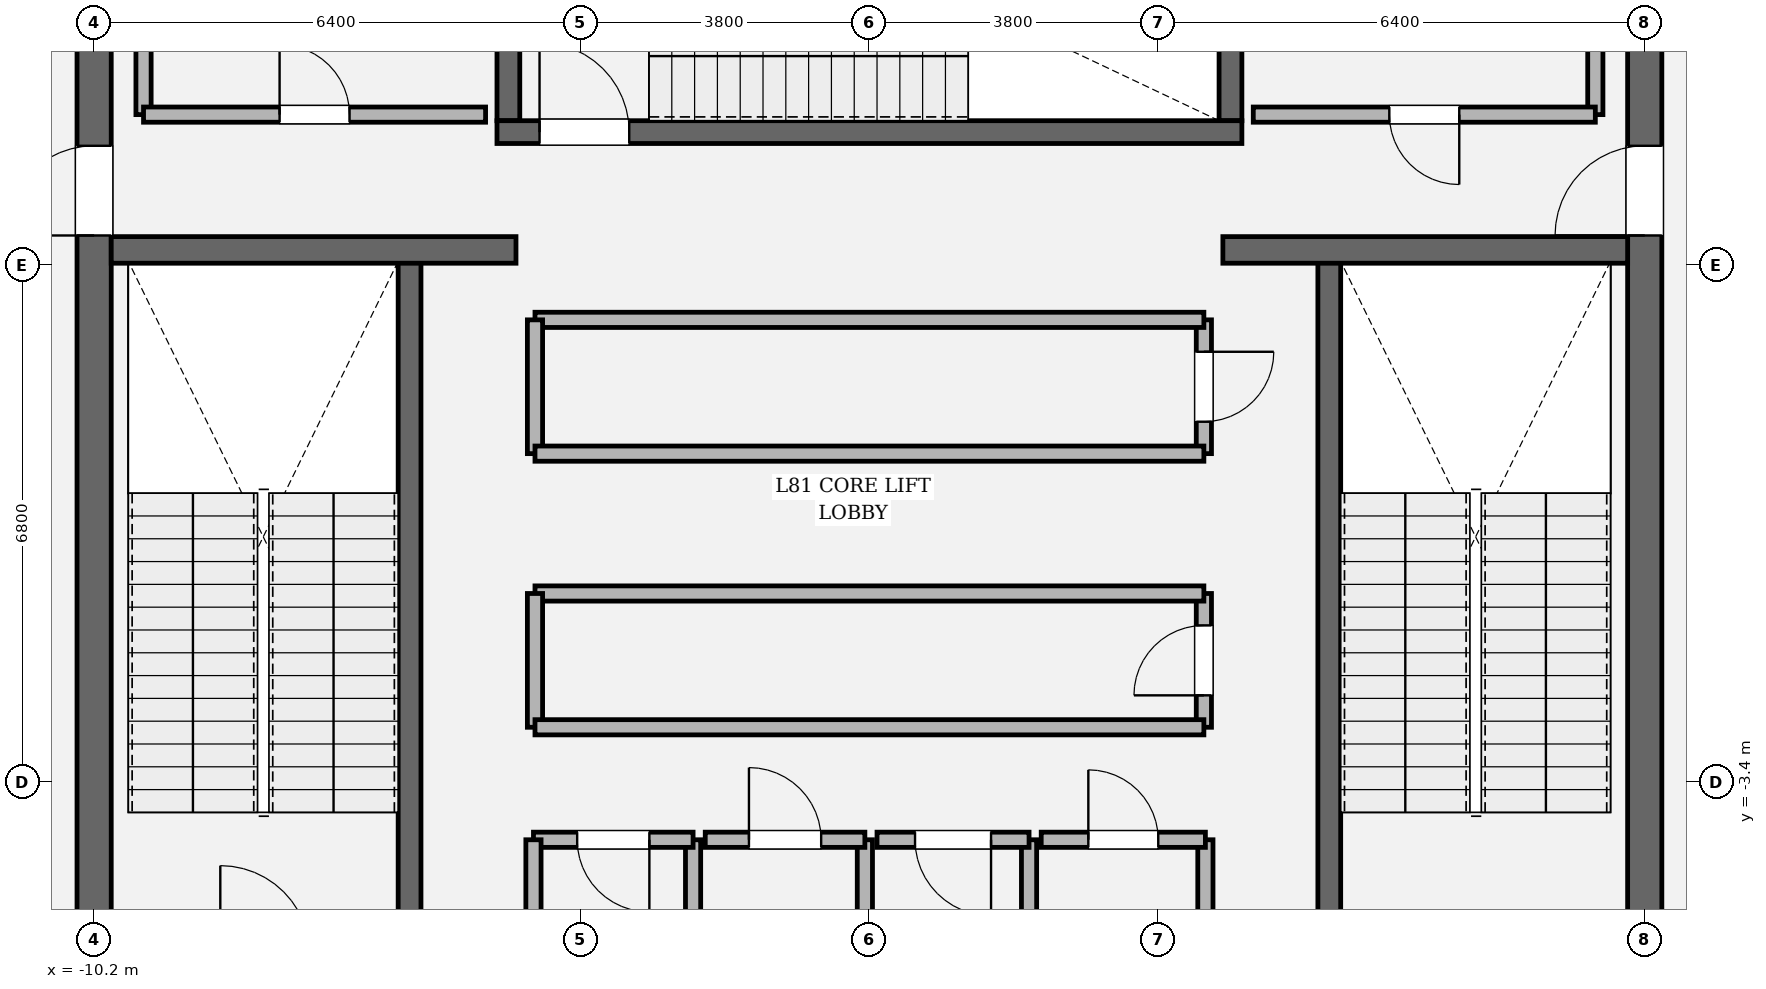
"""IFC4 building model, lengths in metres.
Left out: names, types, materials, properties, quantities, classifications, styles, units other than length and angle.
Written with IfcOpenShell. Run it as: python <this file> out.ifc"""

import sys

from ifc_helpers import new_model, si_unit, direction, frame, frame_2d, origin, place, context, subcontext, project, spatial, rectangle, extrude, element, fill, save


model = new_model("IFC4")
c1 = context("Model", 3, precision=1e-05, world=origin(), true_north=direction((0.0, 1.0)))
c2 = subcontext(c1, "Body", "Model", "MODEL_VIEW")
j1 = project(units=[si_unit("LENGTHUNIT", "METRE"), si_unit("PLANEANGLEUNIT", "RADIAN")], contexts=[c1])
p1 = place(None, origin())
s1 = spatial("IfcSite", under=j1, at=p1, CompositionType="ELEMENT")
p2 = place(p1, origin())
s2 = spatial("IfcBuilding", under=s1, at=p2, CompositionType="ELEMENT")
p3 = place(p2, frame((0.0, 0.0, 343.8)))
s3 = spatial("IfcBuildingStorey", under=s2, at=p3, CompositionType="ELEMENT", Elevation=343.8)
p4 = place(p3, frame((-10.2, -8.975, 0.0), z_axis=(0.0, 0.0, 1.0), x_axis=(0.0, 1.0, 0.0)))
e1 = element("IfcWall", 1, at=p4, inside=s3, PredefinedType="SHEAR", context=c2, shape_type="SweptSolid", body=[
    extrude(rectangle(XDim=17.95, YDim=0.45, at=frame_2d((8.975, 0.0))), origin(), (0.0, 0.0, 1.0), 4.5),
])
p5 = place(p4, frame((12.765, 0.0, 0.0)))
e2 = element("IfcOpeningElement", 2, at=p5, cuts=e1, PredefinedType="OPENING", context=c2, shape_type="SweptSolid", body=[
    extrude(rectangle(XDim=1.18, YDim=2.2, at=frame_2d((0.59, 1.1))), frame((0.0, 0.235, 0.0), z_axis=(0.0, -1.0, 0.0), x_axis=(1.0, 0.0, 0.0)), (0.0, 0.0, 1.0), 0.47),
])
p6 = place(p3, frame((10.2, 8.975, 0.0), z_axis=(0.0, 0.0, 1.0), x_axis=(0.0, -1.0, 0.0)))
e3 = element("IfcWall", 3, at=p6, inside=s3, PredefinedType="SHEAR", context=c2, shape_type="SweptSolid", body=[
    extrude(rectangle(XDim=17.95, YDim=0.45, at=frame_2d((8.975, 0.0))), origin(), (0.0, 0.0, 1.0), 4.5),
])
p7 = place(p6, frame((4.005, 0.0, 0.0)))
e4 = element("IfcOpeningElement", 4, at=p7, cuts=e3, PredefinedType="OPENING", context=c2, shape_type="SweptSolid", body=[
    extrude(rectangle(XDim=1.18, YDim=2.2, at=frame_2d((0.59, 1.1))), frame((0.0, 0.235, 0.0), z_axis=(0.0, -1.0, 0.0), x_axis=(1.0, 0.0, 0.0)), (0.0, 0.0, 1.0), 0.47),
])
for number, where, z_axis, x_axis in (
    (5, (-6.05, -5.5, 0.0), (0.0, 0.0, 1.0), (0.0, 1.0, 0.0)),
    (6, (6.05, 3.45, 0.0), (0.0, 0.0, 1.0), (0.0, -1.0, 0.0)),
):
    element("IfcWall", number, at=place(p3, frame(where, z_axis=z_axis, x_axis=x_axis)), inside=s3, PredefinedType="SOLIDWALL", context=c2, shape_type="SweptSolid", body=[
        extrude(rectangle(XDim=8.95, YDim=0.3, at=frame_2d((4.475, 0.0))), origin(), (0.0, 0.0, 1.0), 4.5),
    ])
for number, where, z_axis, x_axis in (
    (7, (-4.75, 5.3, 0.0), (0.0, 0.0, 1.0), (0.0, 1.0, 0.0)),
    (8, (4.75, 8.975, 0.0), (0.0, 0.0, 1.0), (0.0, -1.0, 0.0)),
):
    element("IfcWall", number, at=place(p3, frame(where, z_axis=z_axis, x_axis=x_axis)), inside=s3, PredefinedType="SOLIDWALL", context=c2, shape_type="SweptSolid", body=[
        extrude(rectangle(XDim=3.675, YDim=0.3, at=frame_2d((1.837, 0.0))), origin(), (0.0, 0.0, 1.0), 4.5),
    ])
p8 = place(p3, frame((-4.9, 5.15, 0.0), z_axis=(0.0, 0.0, 1.0), x_axis=(1.0, 0.0, 0.0)))
e9 = element("IfcWall", 9, at=p8, inside=s3, PredefinedType="SOLIDWALL", context=c2, shape_type="SweptSolid", body=[
    extrude(rectangle(XDim=9.8, YDim=0.3, at=frame_2d((4.9, 0.0))), origin(), (0.0, 0.0, 1.0), 4.5),
])
p9 = place(p8, frame((0.56, 0.0, 0.0)))
e10 = element("IfcOpeningElement", 10, at=p9, cuts=e9, PredefinedType="OPENING", context=c2, shape_type="SweptSolid", body=[
    extrude(rectangle(XDim=1.18, YDim=2.2, at=frame_2d((0.59, 1.1))), frame((0.0, 0.16, 0.0), z_axis=(0.0, -1.0, 0.0), x_axis=(1.0, 0.0, 0.0)), (0.0, 0.0, 1.0), 0.32),
])
for number, where, z_axis, x_axis in (
    (11, (-9.975, 3.6, 0.0), (0.0, 0.0, 1.0), (1.0, 0.0, 0.0)),
    (12, (4.65, 3.6, 0.0), (0.0, 0.0, 1.0), (1.0, 0.0, 0.0)),
):
    element("IfcWall", number, at=place(p3, frame(where, z_axis=z_axis, x_axis=x_axis)), inside=s3, PredefinedType="SOLIDWALL", context=c2, shape_type="SweptSolid", body=[
        extrude(rectangle(XDim=5.325, YDim=0.35, at=frame_2d((2.663, 0.0))), origin(), (0.0, 0.0, 1.0), 4.5),
    ])
p10 = place(p3, frame((-2.32, -5.9, 0.0), z_axis=(0.0, 0.0, 1.0), x_axis=(0.0, 1.0, 0.0)))
e13 = element("IfcWall", 13, at=p10, inside=s3, PredefinedType="SOLIDWALL", context=c2, shape_type="SweptSolid", body=[
    extrude(rectangle(XDim=1.74, YDim=0.2, at=frame_2d((0.87, 0.0))), origin(), (0.0, 0.0, 1.0), 4.28),
])
p11 = place(p3, frame((-2.32, -4.16, 0.0), z_axis=(0.0, 0.0, 1.0), x_axis=(-1.0, 0.0, 0.0)))
e14 = element("IfcWall", 14, at=p11, inside=s3, PredefinedType="SOLIDWALL", context=c2, shape_type="SweptSolid", body=[
    extrude(rectangle(XDim=2.1, YDim=0.2, at=frame_2d((1.05, 0.0))), origin(), (0.0, 0.0, 1.0), 4.28),
])
p12 = place(p11, frame((0.575, 0.0, 0.0)))
e15 = element("IfcOpeningElement", 15, at=p12, cuts=e14, PredefinedType="OPENING", context=c2, shape_type="SweptSolid", body=[
    extrude(rectangle(XDim=0.95, YDim=2.15, at=frame_2d((0.475, 1.075))), frame((0.0, 0.11, 0.0), z_axis=(0.0, -1.0, 0.0), x_axis=(1.0, 0.0, 0.0)), (0.0, 0.0, 1.0), 0.22),
])
for number, where, z_axis, x_axis in (
    (16, (-4.42, -4.16, 0.0), (0.0, 0.0, 1.0), (0.0, -1.0, 0.0)),
    (17, (-0.06, -5.9, 0.0), (0.0, 0.0, 1.0), (0.0, 1.0, 0.0)),
):
    element("IfcWall", number, at=place(p3, frame(where, z_axis=z_axis, x_axis=x_axis)), inside=s3, PredefinedType="SOLIDWALL", context=c2, shape_type="SweptSolid", body=[
        extrude(rectangle(XDim=1.74, YDim=0.2, at=frame_2d((0.87, 0.0))), origin(), (0.0, 0.0, 1.0), 4.28),
    ])
p13 = place(p3, frame((-0.06, -4.16, 0.0), z_axis=(0.0, 0.0, 1.0), x_axis=(-1.0, 0.0, 0.0)))
e18 = element("IfcWall", 18, at=p13, inside=s3, PredefinedType="SOLIDWALL", context=c2, shape_type="SweptSolid", body=[
    extrude(rectangle(XDim=2.1, YDim=0.2, at=frame_2d((1.05, 0.0))), origin(), (0.0, 0.0, 1.0), 4.28),
])
p14 = place(p13, frame((0.575, 0.0, 0.0)))
e19 = element("IfcOpeningElement", 19, at=p14, cuts=e18, PredefinedType="OPENING", context=c2, shape_type="SweptSolid", body=[
    extrude(rectangle(XDim=0.95, YDim=2.15, at=frame_2d((0.475, 1.075))), frame((0.0, 0.11, 0.0), z_axis=(0.0, -1.0, 0.0), x_axis=(1.0, 0.0, 0.0)), (0.0, 0.0, 1.0), 0.22),
])
p15 = place(p3, frame((2.1, -5.9, 0.0), z_axis=(0.0, 0.0, 1.0), x_axis=(0.0, 1.0, 0.0)))
e20 = element("IfcWall", 20, at=p15, inside=s3, PredefinedType="SOLIDWALL", context=c2, shape_type="SweptSolid", body=[
    extrude(rectangle(XDim=1.74, YDim=0.2, at=frame_2d((0.87, 0.0))), origin(), (0.0, 0.0, 1.0), 4.28),
])
p16 = place(p3, frame((2.1, -4.16, 0.0), z_axis=(0.0, 0.0, 1.0), x_axis=(-1.0, 0.0, 0.0)))
e21 = element("IfcWall", 21, at=p16, inside=s3, PredefinedType="SOLIDWALL", context=c2, shape_type="SweptSolid", body=[
    extrude(rectangle(XDim=2.0, YDim=0.2, at=frame_2d((1.0, 0.0))), origin(), (0.0, 0.0, 1.0), 4.28),
])
p17 = place(p16, frame((0.5, 0.0, 0.0)))
e22 = element("IfcOpeningElement", 22, at=p17, cuts=e21, PredefinedType="OPENING", context=c2, shape_type="SweptSolid", body=[
    extrude(rectangle(XDim=1.0, YDim=2.15, at=frame_2d((0.5, 1.075))), frame((0.0, 0.11, 0.0), z_axis=(0.0, -1.0, 0.0), x_axis=(1.0, 0.0, 0.0)), (0.0, 0.0, 1.0), 0.22),
])
p18 = place(p3, frame((4.42, -5.9, 0.0), z_axis=(0.0, 0.0, 1.0), x_axis=(0.0, 1.0, 0.0)))
e23 = element("IfcWall", 23, at=p18, inside=s3, PredefinedType="SOLIDWALL", context=c2, shape_type="SweptSolid", body=[
    extrude(rectangle(XDim=1.74, YDim=0.2, at=frame_2d((0.87, 0.0))), origin(), (0.0, 0.0, 1.0), 4.28),
])
p19 = place(p3, frame((4.42, -4.16, 0.0), z_axis=(0.0, 0.0, 1.0), x_axis=(-1.0, 0.0, 0.0)))
e24 = element("IfcWall", 24, at=p19, inside=s3, PredefinedType="SOLIDWALL", context=c2, shape_type="SweptSolid", body=[
    extrude(rectangle(XDim=2.16, YDim=0.2, at=frame_2d((1.08, 0.0))), origin(), (0.0, 0.0, 1.0), 4.28),
])
p20 = place(p19, frame((0.62, 0.0, 0.0)))
e25 = element("IfcOpeningElement", 25, at=p20, cuts=e24, PredefinedType="OPENING", context=c2, shape_type="SweptSolid", body=[
    extrude(rectangle(XDim=0.92, YDim=2.1, at=frame_2d((0.46, 1.05))), frame((0.0, 0.11, 0.0), z_axis=(0.0, -1.0, 0.0), x_axis=(1.0, 0.0, 0.0)), (0.0, 0.0, 1.0), 0.22),
])
p21 = place(p3, frame((4.4, -2.68, 0.0), z_axis=(0.0, 0.0, 1.0), x_axis=(0.0, 1.0, 0.0)))
e26 = element("IfcWall", 26, at=p21, inside=s3, PredefinedType="SOLIDWALL", context=c2, shape_type="SweptSolid", body=[
    extrude(rectangle(XDim=1.76, YDim=0.2, at=frame_2d((0.88, 0.0))), origin(), (0.0, 0.0, 1.0), 4.28),
])
p22 = place(p21, frame((0.42, 0.0, 0.0)))
e27 = element("IfcOpeningElement", 27, at=p22, cuts=e26, PredefinedType="OPENING", context=c2, shape_type="SweptSolid", body=[
    extrude(rectangle(XDim=0.92, YDim=2.1, at=frame_2d((0.46, 1.05))), frame((0.0, 0.11, 0.0), z_axis=(0.0, -1.0, 0.0), x_axis=(1.0, 0.0, 0.0)), (0.0, 0.0, 1.0), 0.22),
])
p23 = place(p3, frame((4.4, -0.92, 0.0), z_axis=(0.0, 0.0, 1.0), x_axis=(-1.0, 0.0, 0.0)))
e28 = element("IfcWall", 28, at=p23, inside=s3, PredefinedType="SOLIDWALL", context=c2, shape_type="SweptSolid", body=[
    extrude(rectangle(XDim=8.8, YDim=0.2, at=frame_2d((4.4, 0.0))), origin(), (0.0, 0.0, 1.0), 4.28),
])
p24 = place(p3, frame((-4.4, -0.92, 0.0), z_axis=(0.0, 0.0, 1.0), x_axis=(0.0, -1.0, 0.0)))
e29 = element("IfcWall", 29, at=p24, inside=s3, PredefinedType="SOLIDWALL", context=c2, shape_type="SweptSolid", body=[
    extrude(rectangle(XDim=1.76, YDim=0.2, at=frame_2d((0.88, 0.0))), origin(), (0.0, 0.0, 1.0), 4.28),
])
p25 = place(p3, frame((-4.4, -2.68, 0.0), z_axis=(0.0, 0.0, 1.0), x_axis=(1.0, 0.0, 0.0)))
e30 = element("IfcWall", 30, at=p25, inside=s3, PredefinedType="SOLIDWALL", context=c2, shape_type="SweptSolid", body=[
    extrude(rectangle(XDim=8.8, YDim=0.2, at=frame_2d((4.4, 0.0))), origin(), (0.0, 0.0, 1.0), 4.28),
])
p26 = place(p3, frame((4.4, 0.92, 0.0), z_axis=(0.0, 0.0, 1.0), x_axis=(0.0, 1.0, 0.0)))
e31 = element("IfcWall", 31, at=p26, inside=s3, PredefinedType="SOLIDWALL", context=c2, shape_type="SweptSolid", body=[
    extrude(rectangle(XDim=1.76, YDim=0.2, at=frame_2d((0.88, 0.0))), origin(), (0.0, 0.0, 1.0), 4.28),
])
p27 = place(p26, frame((0.42, 0.0, 0.0)))
e32 = element("IfcOpeningElement", 32, at=p27, cuts=e31, PredefinedType="OPENING", context=c2, shape_type="SweptSolid", body=[
    extrude(rectangle(XDim=0.92, YDim=2.1, at=frame_2d((0.46, 1.05))), frame((0.0, 0.11, 0.0), z_axis=(0.0, -1.0, 0.0), x_axis=(1.0, 0.0, 0.0)), (0.0, 0.0, 1.0), 0.22),
])
p28 = place(p3, frame((4.4, 2.68, 0.0), z_axis=(0.0, 0.0, 1.0), x_axis=(-1.0, 0.0, 0.0)))
e33 = element("IfcWall", 33, at=p28, inside=s3, PredefinedType="SOLIDWALL", context=c2, shape_type="SweptSolid", body=[
    extrude(rectangle(XDim=8.8, YDim=0.2, at=frame_2d((4.4, 0.0))), origin(), (0.0, 0.0, 1.0), 4.28),
])
p29 = place(p3, frame((-4.4, 2.68, 0.0), z_axis=(0.0, 0.0, 1.0), x_axis=(0.0, -1.0, 0.0)))
e34 = element("IfcWall", 34, at=p29, inside=s3, PredefinedType="SOLIDWALL", context=c2, shape_type="SweptSolid", body=[
    extrude(rectangle(XDim=1.76, YDim=0.2, at=frame_2d((0.88, 0.0))), origin(), (0.0, 0.0, 1.0), 4.28),
])
p30 = place(p3, frame((-4.4, 0.92, 0.0), z_axis=(0.0, 0.0, 1.0), x_axis=(1.0, 0.0, 0.0)))
e35 = element("IfcWall", 35, at=p30, inside=s3, PredefinedType="SOLIDWALL", context=c2, shape_type="SweptSolid", body=[
    extrude(rectangle(XDim=8.8, YDim=0.2, at=frame_2d((4.4, 0.0))), origin(), (0.0, 0.0, 1.0), 4.28),
])
p31 = place(p3, frame((-9.55, 8.65, 0.0), z_axis=(0.0, 0.0, 1.0), x_axis=(0.0, -1.0, 0.0)))
e36 = element("IfcWall", 36, at=p31, inside=s3, PredefinedType="SOLIDWALL", context=c2, shape_type="SweptSolid", body=[
    extrude(rectangle(XDim=3.27, YDim=0.2, at=frame_2d((1.635, 0.0))), origin(), (0.0, 0.0, 1.0), 4.28),
])
p32 = place(p3, frame((-9.55, 5.38, 0.0), z_axis=(0.0, 0.0, 1.0), x_axis=(1.0, 0.0, 0.0)))
e37 = element("IfcWall", 37, at=p32, inside=s3, PredefinedType="SOLIDWALL", context=c2, shape_type="SweptSolid", body=[
    extrude(rectangle(XDim=4.5, YDim=0.2, at=frame_2d((2.25, 0.0))), origin(), (0.0, 0.0, 1.0), 4.28),
])
p33 = place(p32, frame((1.79, 0.0, 0.0)))
e38 = element("IfcOpeningElement", 38, at=p33, cuts=e37, PredefinedType="OPENING", context=c2, shape_type="SweptSolid", body=[
    extrude(rectangle(XDim=0.92, YDim=2.1, at=frame_2d((0.46, 1.05))), frame((0.0, 0.11, 0.0), z_axis=(0.0, -1.0, 0.0), x_axis=(1.0, 0.0, 0.0)), (0.0, 0.0, 1.0), 0.22),
])
p34 = place(p3, frame((9.55, 5.38, 0.0), z_axis=(0.0, 0.0, 1.0), x_axis=(0.0, 1.0, 0.0)))
e39 = element("IfcWall", 39, at=p34, inside=s3, PredefinedType="SOLIDWALL", context=c2, shape_type="SweptSolid", body=[
    extrude(rectangle(XDim=3.27, YDim=0.2, at=frame_2d((1.635, 0.0))), origin(), (0.0, 0.0, 1.0), 4.28),
])
p35 = place(p3, frame((5.05, 5.38, 0.0), z_axis=(0.0, 0.0, 1.0), x_axis=(1.0, 0.0, 0.0)))
e40 = element("IfcWall", 40, at=p35, inside=s3, PredefinedType="SOLIDWALL", context=c2, shape_type="SweptSolid", body=[
    extrude(rectangle(XDim=4.5, YDim=0.2, at=frame_2d((2.25, 0.0))), origin(), (0.0, 0.0, 1.0), 4.28),
])
p36 = place(p35, frame((1.79, 0.0, 0.0)))
e41 = element("IfcOpeningElement", 41, at=p36, cuts=e40, PredefinedType="OPENING", context=c2, shape_type="SweptSolid", body=[
    extrude(rectangle(XDim=0.92, YDim=2.1, at=frame_2d((0.46, 1.05))), frame((0.0, 0.11, 0.0), z_axis=(0.0, -1.0, 0.0), x_axis=(1.0, 0.0, 0.0)), (0.0, 0.0, 1.0), 0.22),
])
p37 = place(p9, origin())
e42 = element("IfcDoor", 42, at=p37, inside=s3, OperationType="SINGLE_SWING_LEFT", PredefinedType="DOOR", context=c2, shape_type="SweptSolid", body=[
    extrude(rectangle(XDim=1.18, YDim=2.2, at=frame_2d((0.59, 1.1))), frame((0.0, 0.025, 0.0), z_axis=(0.0, -1.0, 0.0), x_axis=(1.0, 0.0, 0.0)), (0.0, 0.0, 1.0), 0.05),
])
fill(e10, e42)
p38 = place(p5, origin())
e43 = element("IfcDoor", 43, at=p38, inside=s3, OperationType="SINGLE_SWING_LEFT", PredefinedType="DOOR", context=c2, shape_type="SweptSolid", body=[
    extrude(rectangle(XDim=1.18, YDim=2.2, at=frame_2d((0.59, 1.1))), frame((0.0, 0.025, 0.0), z_axis=(0.0, -1.0, 0.0), x_axis=(1.0, 0.0, 0.0)), (0.0, 0.0, 1.0), 0.05),
])
fill(e2, e43)
p39 = place(p7, origin())
e44 = element("IfcDoor", 44, at=p39, inside=s3, OperationType="SINGLE_SWING_RIGHT", PredefinedType="DOOR", context=c2, shape_type="SweptSolid", body=[
    extrude(rectangle(XDim=1.18, YDim=2.2, at=frame_2d((0.59, 1.1))), frame((0.0, 0.025, 0.0), z_axis=(0.0, -1.0, 0.0), x_axis=(1.0, 0.0, 0.0)), (0.0, 0.0, 1.0), 0.05),
])
fill(e4, e44)
p40 = place(p12, origin())
e45 = element("IfcDoor", 45, at=p40, inside=s3, OperationType="SINGLE_SWING_LEFT", PredefinedType="DOOR", context=c2, shape_type="SweptSolid", body=[
    extrude(rectangle(XDim=0.95, YDim=2.15, at=frame_2d((0.475, 1.075))), frame((0.0, 0.025, 0.0), z_axis=(0.0, -1.0, 0.0), x_axis=(1.0, 0.0, 0.0)), (0.0, 0.0, 1.0), 0.05),
])
fill(e15, e45)
p41 = place(p14, origin())
e46 = element("IfcDoor", 46, at=p41, inside=s3, OperationType="SINGLE_SWING_RIGHT", PredefinedType="DOOR", context=c2, shape_type="SweptSolid", body=[
    extrude(rectangle(XDim=0.95, YDim=2.15, at=frame_2d((0.475, 1.075))), frame((0.0, 0.025, 0.0), z_axis=(0.0, -1.0, 0.0), x_axis=(1.0, 0.0, 0.0)), (0.0, 0.0, 1.0), 0.05),
])
fill(e19, e46)
p42 = place(p17, origin())
e47 = element("IfcDoor", 47, at=p42, inside=s3, OperationType="SINGLE_SWING_LEFT", PredefinedType="DOOR", context=c2, shape_type="SweptSolid", body=[
    extrude(rectangle(XDim=1.0, YDim=2.15, at=frame_2d((0.5, 1.075))), frame((0.0, 0.025, 0.0), z_axis=(0.0, -1.0, 0.0), x_axis=(1.0, 0.0, 0.0)), (0.0, 0.0, 1.0), 0.05),
])
fill(e22, e47)
p43 = place(p20, origin())
e48 = element("IfcDoor", 48, at=p43, inside=s3, OperationType="SINGLE_SWING_RIGHT", PredefinedType="DOOR", context=c2, shape_type="SweptSolid", body=[
    extrude(rectangle(XDim=0.92, YDim=2.1, at=frame_2d((0.46, 1.05))), frame((0.0, 0.025, 0.0), z_axis=(0.0, -1.0, 0.0), x_axis=(1.0, 0.0, 0.0)), (0.0, 0.0, 1.0), 0.05),
])
fill(e25, e48)
p44 = place(p22, origin())
e49 = element("IfcDoor", 49, at=p44, inside=s3, OperationType="SINGLE_SWING_LEFT", PredefinedType="DOOR", context=c2, shape_type="SweptSolid", body=[
    extrude(rectangle(XDim=0.92, YDim=2.1, at=frame_2d((0.46, 1.05))), frame((0.0, 0.025, 0.0), z_axis=(0.0, -1.0, 0.0), x_axis=(1.0, 0.0, 0.0)), (0.0, 0.0, 1.0), 0.05),
])
fill(e27, e49)
p45 = place(p27, origin())
e50 = element("IfcDoor", 50, at=p45, inside=s3, OperationType="SINGLE_SWING_RIGHT", PredefinedType="DOOR", context=c2, shape_type="SweptSolid", body=[
    extrude(rectangle(XDim=0.92, YDim=2.1, at=frame_2d((0.46, 1.05))), frame((0.0, 0.025, 0.0), z_axis=(0.0, -1.0, 0.0), x_axis=(1.0, 0.0, 0.0)), (0.0, 0.0, 1.0), 0.05),
])
fill(e32, e50)
p46 = place(p33, origin())
e51 = element("IfcDoor", 51, at=p46, inside=s3, OperationType="SINGLE_SWING_LEFT", PredefinedType="DOOR", context=c2, shape_type="SweptSolid", body=[
    extrude(rectangle(XDim=0.92, YDim=2.1, at=frame_2d((0.46, 1.05))), frame((0.0, 0.025, 0.0), z_axis=(0.0, -1.0, 0.0), x_axis=(1.0, 0.0, 0.0)), (0.0, 0.0, 1.0), 0.05),
])
fill(e38, e51)
p47 = place(p36, origin())
e52 = element("IfcDoor", 52, at=p47, inside=s3, OperationType="SINGLE_SWING_RIGHT", PredefinedType="DOOR", context=c2, shape_type="SweptSolid", body=[
    extrude(rectangle(XDim=0.92, YDim=2.1, at=frame_2d((0.46, 1.05))), frame((0.0, 0.025, 0.0), z_axis=(0.0, -1.0, 0.0), x_axis=(1.0, 0.0, 0.0)), (0.0, 0.0, 1.0), 0.05),
])
fill(e41, e52)
save(model, sys.argv[1])
